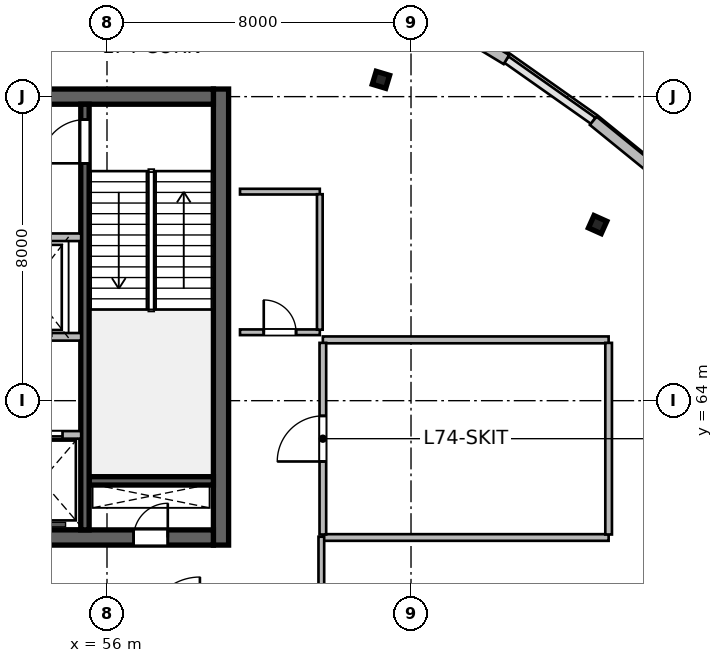
"""IFC4 building model, lengths in metres.
Left out: names, types, materials, properties, quantities, classifications, styles, units other than length and angle.
Written with IfcOpenShell. Run it as: python <this file> out.ifc"""

import sys

from ifc_helpers import new_model, si_unit, direction, frame, frame_2d, origin, origin_2d, place, context, subcontext, project, spatial, rectangle, i_section, extrude, source, transform, mapped, element, fill, save


model = new_model("IFC4")
c1 = context("Model", 3, precision=1e-05, world=origin(), true_north=direction((0.0, 1.0)))
c2 = subcontext(c1, "Body", "Model", "MODEL_VIEW")
j1 = project(units=[si_unit("LENGTHUNIT", "METRE"), si_unit("PLANEANGLEUNIT", "RADIAN")], contexts=[c1])
p1 = place(None, origin())
s1 = spatial("IfcSite", under=j1, at=p1, CompositionType="ELEMENT")
p2 = place(p1, origin())
s2 = spatial("IfcBuilding", under=s1, at=p2, CompositionType="ELEMENT")
p3 = place(p2, frame((0.0, 0.0, 303.0)))
s3 = spatial("IfcBuildingStorey", under=s2, at=p3, CompositionType="ELEMENT", Elevation=303.0)
m1 = source(origin(), c2, "Body", "SweptSolid", [
    extrude(rectangle(XDim=12.0, YDim=0.4, at=frame_2d((6.0, 0.0))), origin(), (0.0, 0.0, 1.0), 4.8),
])
p4 = place(p3, frame((59.0, 60.2, 0.0), z_axis=(0.0, 0.0, 1.0), x_axis=(0.0, 1.0, 0.0)))
e1 = element("IfcWall", 1, at=p4, inside=s3, PredefinedType="SHEAR", context=c2, shape_type="MappedRepresentation", body=[
    mapped(m1, transform((0.0, 0.0, 0.0), scale=1.0)),
])
m2 = source(origin(), c2, "Body", "SweptSolid", [
    extrude(rectangle(XDim=21.6, YDim=0.4, at=frame_2d((10.8, 0.0))), origin(), (0.0, 0.0, 1.0), 4.8),
])
p5 = place(p3, frame((37.2, 60.4, 0.0), z_axis=(0.0, 0.0, 1.0), x_axis=(1.0, 0.0, 0.0)))
e2 = element("IfcWall", 2, at=p5, inside=s3, PredefinedType="SHEAR", context=c2, shape_type="MappedRepresentation", body=[
    mapped(m2, transform((0.0, 0.0, 0.0), scale=1.0)),
])
p6 = place(p5, frame((1.1, 0.0, 0.0)))
e3 = element("IfcOpeningElement", 3, at=p6, cuts=e2, PredefinedType="OPENING", context=c2, shape_type="SweptSolid", body=[
    extrude(rectangle(XDim=1.15, YDim=2.15, at=frame_2d((0.575, 1.075))), frame((0.0, 0.21, 0.0), z_axis=(0.0, -1.0, 0.0), x_axis=(1.0, 0.0, 0.0)), (0.0, 0.0, 1.0), 0.42),
])
p7 = place(p5, frame((19.5, 0.0, 0.0)))
e4 = element("IfcOpeningElement", 4, at=p7, cuts=e2, PredefinedType="OPENING", context=c2, shape_type="SweptSolid", body=[
    extrude(rectangle(XDim=0.9, YDim=2.1, at=frame_2d((0.45, 1.05))), frame((0.0, 0.21, 0.0), z_axis=(0.0, -1.0, 0.0), x_axis=(1.0, 0.0, 0.0)), (0.0, 0.0, 1.0), 0.42),
])
p8 = place(p5, frame((12.02, 0.0, 0.0)))
e5 = element("IfcOpeningElement", 5, at=p8, cuts=e2, PredefinedType="OPENING", context=c2, shape_type="SweptSolid", body=[
    extrude(rectangle(XDim=1.6, YDim=2.15, at=frame_2d((0.8, 1.075))), frame((0.0, 0.21, 0.0), z_axis=(0.0, -1.0, 0.0), x_axis=(1.0, 0.0, 0.0)), (0.0, 0.0, 1.0), 0.42),
])
p9 = place(p3, frame((37.2, 72.0, 0.0), z_axis=(0.0, 0.0, 1.0), x_axis=(1.0, 0.0, 0.0)))
e6 = element("IfcWall", 6, at=p9, inside=s3, PredefinedType="SHEAR", context=c2, shape_type="MappedRepresentation", body=[
    mapped(m2, transform((0.0, 0.0, 0.0), scale=1.0)),
])
p10 = place(p9, frame((1.2, 0.0, 0.0)))
e7 = element("IfcOpeningElement", 7, at=p10, cuts=e6, PredefinedType="OPENING", context=c2, shape_type="SweptSolid", body=[
    extrude(rectangle(XDim=0.9, YDim=2.1, at=frame_2d((0.45, 1.05))), frame((0.0, 0.21, 0.0), z_axis=(0.0, -1.0, 0.0), x_axis=(1.0, 0.0, 0.0)), (0.0, 0.0, 1.0), 0.42),
])
p11 = place(p9, frame((14.7, 0.0, 0.0)))
e8 = element("IfcOpeningElement", 8, at=p11, cuts=e6, PredefinedType="OPENING", context=c2, shape_type="SweptSolid", body=[
    extrude(rectangle(XDim=1.2, YDim=2.15, at=frame_2d((0.6, 1.075))), frame((0.0, 0.21, 0.0), z_axis=(0.0, -1.0, 0.0), x_axis=(1.0, 0.0, 0.0)), (0.0, 0.0, 1.0), 0.42),
])
p12 = place(p9, frame((4.15, 0.0, 0.0)))
e9 = element("IfcOpeningElement", 9, at=p12, cuts=e6, PredefinedType="OPENING", context=c2, shape_type="SweptSolid", body=[
    extrude(rectangle(XDim=1.3, YDim=2.15, at=frame_2d((0.65, 1.075))), frame((0.0, 0.21, 0.0), z_axis=(0.0, -1.0, 0.0), x_axis=(1.0, 0.0, 0.0)), (0.0, 0.0, 1.0), 0.42),
])
p13 = place(p9, frame((6.76, 0.0, 0.0)))
e10 = element("IfcOpeningElement", 10, at=p13, cuts=e6, PredefinedType="OPENING", context=c2, shape_type="SweptSolid", body=[
    extrude(rectangle(XDim=0.85, YDim=2.1, at=frame_2d((0.425, 1.05))), frame((0.0, 0.21, 0.0), z_axis=(0.0, -1.0, 0.0), x_axis=(1.0, 0.0, 0.0)), (0.0, 0.0, 1.0), 0.42),
])
p14 = place(p9, frame((8.76, 0.0, 0.0)))
e11 = element("IfcOpeningElement", 11, at=p14, cuts=e6, PredefinedType="OPENING", context=c2, shape_type="SweptSolid", body=[
    extrude(rectangle(XDim=0.85, YDim=2.1, at=frame_2d((0.425, 1.05))), frame((0.0, 0.21, 0.0), z_axis=(0.0, -1.0, 0.0), x_axis=(1.0, 0.0, 0.0)), (0.0, 0.0, 1.0), 0.42),
])
p15 = place(p9, frame((10.725, 0.0, 0.0)))
e12 = element("IfcOpeningElement", 12, at=p15, cuts=e6, PredefinedType="OPENING", context=c2, shape_type="SweptSolid", body=[
    extrude(rectangle(XDim=0.85, YDim=2.1, at=frame_2d((0.425, 1.05))), frame((0.0, 0.21, 0.0), z_axis=(0.0, -1.0, 0.0), x_axis=(1.0, 0.0, 0.0)), (0.0, 0.0, 1.0), 0.42),
])
m3 = source(origin(), c2, "Body", "SweptSolid", [
    extrude(rectangle(XDim=3.27, YDim=0.22, at=frame_2d((1.635, 0.0))), origin(), (0.0, 0.0, 1.0), 4.8),
])
p16 = place(p3, frame((55.53, 61.89, 0.0), z_axis=(0.0, 0.0, 1.0), x_axis=(1.0, 0.0, 0.0)))
e13 = element("IfcWall", 13, at=p16, inside=s3, PredefinedType="SHEAR", context=c2, shape_type="MappedRepresentation", body=[
    mapped(m3, transform((0.0, 0.0, 0.0), scale=1.0)),
])
m4 = source(origin(), c2, "Body", "SweptSolid", [
    extrude(rectangle(XDim=11.2, YDim=0.22, at=frame_2d((5.6, 0.0))), origin(), (0.0, 0.0, 1.0), 4.8),
])
p17 = place(p3, frame((55.42, 60.6, 0.0), z_axis=(0.0, 0.0, 1.0), x_axis=(0.0, 1.0, 0.0)))
e14 = element("IfcWall", 14, at=p17, inside=s3, PredefinedType="SHEAR", context=c2, shape_type="MappedRepresentation", body=[
    mapped(m4, transform((0.0, 0.0, 0.0), scale=1.0)),
])
p18 = place(p17, frame((9.645, 0.0, 0.0)))
e15 = element("IfcOpeningElement", 15, at=p18, cuts=e14, PredefinedType="OPENING", context=c2, shape_type="SweptSolid", body=[
    extrude(rectangle(XDim=1.15, YDim=2.15, at=frame_2d((0.575, 1.075))), frame((0.0, 0.12, 0.0), z_axis=(0.0, -1.0, 0.0), x_axis=(1.0, 0.0, 0.0)), (0.0, 0.0, 1.0), 0.24),
])
m5 = source(origin(), c2, "Body", "SweptSolid", [
    extrude(i_section(OverallWidth=0.369, OverallDepth=0.356, WebThickness=0.011, FlangeThickness=0.018, at=origin_2d()), origin(), (0.0, 0.0, 1.0), 4.8),
])
for number, where, z_axis, x_axis in (
    (16, (63.209, 72.442, 0.0), (0.0, 0.0, 1.0), (0.289, 0.957, 0.0)),
    (17, (68.91, 68.633, 0.0), (0.0, 0.0, 1.0), (0.409, 0.912, 0.0)),
):
    element("IfcColumn", number, at=place(p3, frame(where, z_axis=z_axis, x_axis=x_axis)), inside=s3, PredefinedType="COLUMN", context=c2, shape_type="MappedRepresentation", body=[
        mapped(m5, transform((0.0, 0.0, 0.0), scale=1.0)),
    ])
m6 = source(origin(), c2, "Body", "SweptSolid", [
    extrude(rectangle(XDim=2.748, YDim=0.28, at=frame_2d((1.374, 0.0))), origin(), (0.0, 0.0, 1.0), 4.54),
])
p19 = place(p3, frame((64.157, 74.396, 0.0), z_axis=(0.0, 0.0, 1.0), x_axis=(0.856149718453, -0.516727838996, 0.0)))
e18 = element("IfcWall", 18, at=p19, inside=s3, PredefinedType="SOLIDWALL", context=c2, shape_type="MappedRepresentation", body=[
    mapped(m6, transform((0.0, 0.0, 0.0), scale=1.0)),
])
m7 = source(origin(), c2, "Body", "SweptSolid", [
    extrude(rectangle(XDim=2.812, YDim=0.28, at=frame_2d((1.406, 0.0))), origin(), (0.0, 0.0, 1.0), 4.54),
])
p20 = place(p3, frame((68.795, 71.365, 0.0), z_axis=(0.0, 0.0, 1.0), x_axis=(0.775880230716, -0.630880232361, 0.0)))
e19 = element("IfcWall", 19, at=p20, inside=s3, PredefinedType="SOLIDWALL", context=c2, shape_type="MappedRepresentation", body=[
    mapped(m7, transform((0.0, 0.0, 0.0), scale=1.0)),
])
m8 = source(origin(), c2, "Body", "SweptSolid", [
    extrude(rectangle(XDim=5.62, YDim=0.2, at=frame_2d((2.81, 0.0))), origin(), (0.0, 0.0, 1.0), 4.54),
])
p21 = place(p3, frame((49.7, 68.3, 0.0), z_axis=(0.0, 0.0, 1.0), x_axis=(1.0, 0.0, 0.0)))
e20 = element("IfcWall", 20, at=p21, inside=s3, PredefinedType="SOLIDWALL", context=c2, shape_type="MappedRepresentation", body=[
    mapped(m8, transform((0.0, 0.0, 0.0), scale=1.0)),
])
p22 = place(p21, frame((1.6, 0.0, 0.0)))
e21 = element("IfcOpeningElement", 21, at=p22, cuts=e20, PredefinedType="OPENING", context=c2, shape_type="SweptSolid", body=[
    extrude(rectangle(XDim=1.1, YDim=2.15, at=frame_2d((0.55, 1.075))), frame((0.0, 0.11, 0.0), z_axis=(0.0, -1.0, 0.0), x_axis=(1.0, 0.0, 0.0)), (0.0, 0.0, 1.0), 0.22),
])
p23 = place(p21, frame((3.7, 0.0, 0.0)))
e22 = element("IfcOpeningElement", 22, at=p23, cuts=e20, PredefinedType="OPENING", context=c2, shape_type="SweptSolid", body=[
    extrude(rectangle(XDim=1.1, YDim=2.15, at=frame_2d((0.55, 1.075))), frame((0.0, 0.11, 0.0), z_axis=(0.0, -1.0, 0.0), x_axis=(1.0, 0.0, 0.0)), (0.0, 0.0, 1.0), 0.22),
])
p24 = place(p3, frame((49.7, 65.68, 0.0), z_axis=(0.0, 0.0, 1.0), x_axis=(1.0, 0.0, 0.0)))
e23 = element("IfcWall", 23, at=p24, inside=s3, PredefinedType="SOLIDWALL", context=c2, shape_type="MappedRepresentation", body=[
    mapped(m8, transform((0.0, 0.0, 0.0), scale=1.0)),
])
m9 = source(origin(), c2, "Body", "SweptSolid", [
    extrude(rectangle(XDim=4.1, YDim=0.2, at=frame_2d((2.05, 0.0))), origin(), (0.0, 0.0, 1.0), 4.54),
])
p25 = place(p3, frame((51.22, 63.1, 0.0), z_axis=(0.0, 0.0, 1.0), x_axis=(1.0, 0.0, 0.0)))
e24 = element("IfcWall", 24, at=p25, inside=s3, PredefinedType="SOLIDWALL", context=c2, shape_type="MappedRepresentation", body=[
    mapped(m9, transform((0.0, 0.0, 0.0), scale=1.0)),
])
p26 = place(p25, frame((0.51, 0.0, 0.0)))
e25 = element("IfcOpeningElement", 25, at=p26, cuts=e24, PredefinedType="OPENING", context=c2, shape_type="SweptSolid", body=[
    extrude(rectangle(XDim=1.1, YDim=2.15, at=frame_2d((0.55, 1.075))), frame((0.0, 0.11, 0.0), z_axis=(0.0, -1.0, 0.0), x_axis=(1.0, 0.0, 0.0)), (0.0, 0.0, 1.0), 0.22),
])
p27 = place(p25, frame((2.51, 0.0, 0.0)))
e26 = element("IfcOpeningElement", 26, at=p27, cuts=e24, PredefinedType="OPENING", context=c2, shape_type="SweptSolid", body=[
    extrude(rectangle(XDim=1.1, YDim=2.15, at=frame_2d((0.55, 1.075))), frame((0.0, 0.11, 0.0), z_axis=(0.0, -1.0, 0.0), x_axis=(1.0, 0.0, 0.0)), (0.0, 0.0, 1.0), 0.22),
])
m10 = source(origin(), c2, "Body", "SweptSolid", [
    extrude(rectangle(XDim=2.1, YDim=0.15, at=frame_2d((1.05, 0.0))), origin(), (0.0, 0.0, 1.0), 4.54),
])
p28 = place(p3, frame((59.5, 65.8, 0.0), z_axis=(0.0, 0.0, 1.0), x_axis=(1.0, 0.0, 0.0)))
e27 = element("IfcWall", 27, at=p28, inside=s3, PredefinedType="PARTITIONING", context=c2, shape_type="MappedRepresentation", body=[
    mapped(m10, transform((0.0, 0.0, 0.0), scale=1.0)),
])
p29 = place(p28, frame((0.625, 0.0, 0.0)))
e28 = element("IfcOpeningElement", 28, at=p29, cuts=e27, PredefinedType="OPENING", context=c2, shape_type="SweptSolid", body=[
    extrude(rectangle(XDim=0.85, YDim=2.1, at=frame_2d((0.425, 1.05))), frame((0.0, 0.085, 0.0), z_axis=(0.0, -1.0, 0.0), x_axis=(1.0, 0.0, 0.0)), (0.0, 0.0, 1.0), 0.17),
])
p30 = place(p3, frame((59.5, 69.5, 0.0), z_axis=(0.0, 0.0, 1.0), x_axis=(1.0, 0.0, 0.0)))
e29 = element("IfcWall", 29, at=p30, inside=s3, PredefinedType="PARTITIONING", context=c2, shape_type="MappedRepresentation", body=[
    mapped(m10, transform((0.0, 0.0, 0.0), scale=1.0)),
])
m11 = source(origin(), c2, "Body", "SweptSolid", [
    extrude(rectangle(XDim=3.565, YDim=0.15, at=frame_2d((1.783, 0.0))), origin(), (0.0, 0.0, 1.0), 4.54),
])
p31 = place(p3, frame((61.6, 65.867, 0.0), z_axis=(0.0, 0.0, 1.0), x_axis=(0.0, 1.0, 0.0)))
e30 = element("IfcWall", 30, at=p31, inside=s3, PredefinedType="PARTITIONING", context=c2, shape_type="MappedRepresentation", body=[
    mapped(m11, transform((0.0, 0.0, 0.0), scale=1.0)),
])
m12 = source(origin(), c2, "Body", "SweptSolid", [
    extrude(rectangle(XDim=7.52, YDim=0.175, at=frame_2d((3.76, 0.0))), origin(), (0.0, 0.0, 1.0), 4.54),
])
p32 = place(p3, frame((61.68, 60.4, 0.0), z_axis=(0.0, 0.0, 1.0), x_axis=(1.0, 0.0, 0.0)))
e31 = element("IfcWall", 31, at=p32, inside=s3, PredefinedType="PARTITIONING", context=c2, shape_type="MappedRepresentation", body=[
    mapped(m12, transform((0.0, 0.0, 0.0), scale=1.0)),
])
m13 = source(origin(), c2, "Body", "SweptSolid", [
    extrude(rectangle(XDim=7.52, YDim=0.18, at=frame_2d((3.76, 0.0))), origin(), (0.0, 0.0, 1.0), 4.54),
])
p33 = place(p3, frame((61.68, 65.6, 0.0), z_axis=(0.0, 0.0, 1.0), x_axis=(1.0, 0.0, 0.0)))
e32 = element("IfcWall", 32, at=p33, inside=s3, PredefinedType="PLUMBINGWALL", context=c2, shape_type="MappedRepresentation", body=[
    mapped(m13, transform((0.0, 0.0, 0.0), scale=1.0)),
])
m14 = source(origin(), c2, "Body", "SweptSolid", [
    extrude(rectangle(XDim=5.042, YDim=0.175, at=frame_2d((2.521, 0.0))), origin(), (0.0, 0.0, 1.0), 4.54),
])
p34 = place(p3, frame((61.68, 60.479, 0.0), z_axis=(0.0, 0.0, 1.0), x_axis=(0.0, 1.0, 0.0)))
e33 = element("IfcWall", 33, at=p34, inside=s3, PredefinedType="PARTITIONING", context=c2, shape_type="MappedRepresentation", body=[
    mapped(m14, transform((0.0, 0.0, 0.0), scale=1.0)),
])
p35 = place(p34, frame((1.921, 0.0, 0.0)))
e34 = element("IfcOpeningElement", 34, at=p35, cuts=e33, PredefinedType="OPENING", context=c2, shape_type="SweptSolid", body=[
    extrude(rectangle(XDim=1.2, YDim=2.15, at=frame_2d((0.6, 1.075))), frame((0.0, 0.098, 0.0), z_axis=(0.0, -1.0, 0.0), x_axis=(1.0, 0.0, 0.0)), (0.0, 0.0, 1.0), 0.195),
])
p36 = place(p3, frame((69.2, 60.479, 0.0), z_axis=(0.0, 0.0, 1.0), x_axis=(0.0, 1.0, 0.0)))
e35 = element("IfcWall", 35, at=p36, inside=s3, PredefinedType="PARTITIONING", context=c2, shape_type="MappedRepresentation", body=[
    mapped(m14, transform((0.0, 0.0, 0.0), scale=1.0)),
])
m15 = source(origin(), c2, "Body", "SweptSolid", [
    extrude(rectangle(XDim=2.46, YDim=0.15, at=frame_2d((1.23, 0.0))), origin(), (0.0, 0.0, 1.0), 4.54),
])
p37 = place(p3, frame((61.64, 57.96, 0.0), z_axis=(0.0, 0.0, 1.0), x_axis=(0.0, 1.0, 0.0)))
e36 = element("IfcWall", 36, at=p37, inside=s3, PredefinedType="PARTITIONING", context=c2, shape_type="MappedRepresentation", body=[
    mapped(m15, transform((0.0, 0.0, 0.0), scale=1.0)),
])
m16 = source(origin(), c2, "Body", "SweptSolid", [
    extrude(rectangle(XDim=0.9, YDim=2.1, at=frame_2d((0.45, 1.05))), frame((0.0, 0.025, 0.0), z_axis=(0.0, -1.0, 0.0), x_axis=(1.0, 0.0, 0.0)), (0.0, 0.0, 1.0), 0.05),
])
p38 = place(p7, origin())
e37 = element("IfcDoor", 37, at=p38, inside=s3, OperationType="SINGLE_SWING_RIGHT", PredefinedType="DOOR", context=c2, shape_type="MappedRepresentation", body=[
    mapped(m16, transform((0.0, 0.0, 0.0), scale=1.0)),
])
fill(e4, e37)
m17 = source(origin(), c2, "Body", "SweptSolid", [
    extrude(rectangle(XDim=1.15, YDim=2.15, at=frame_2d((0.575, 1.075))), frame((0.0, 0.025, 0.0), z_axis=(0.0, -1.0, 0.0), x_axis=(1.0, 0.0, 0.0)), (0.0, 0.0, 1.0), 0.05),
])
p39 = place(p18, origin())
e38 = element("IfcDoor", 38, at=p39, inside=s3, OperationType="SINGLE_SWING_LEFT", PredefinedType="DOOR", context=c2, shape_type="MappedRepresentation", body=[
    mapped(m17, transform((0.0, 0.0, 0.0), scale=1.0)),
])
fill(e15, e38)
m18 = source(origin(), c2, "Body", "SweptSolid", [
    extrude(rectangle(XDim=1.1, YDim=2.15, at=frame_2d((0.55, 1.075))), frame((0.0, 0.025, 0.0), z_axis=(0.0, -1.0, 0.0), x_axis=(1.0, 0.0, 0.0)), (0.0, 0.0, 1.0), 0.05),
])
p40 = place(p27, origin())
e39 = element("IfcDoor", 39, at=p40, inside=s3, OperationType="DOUBLE_DOOR_SLIDING", PredefinedType="DOOR", context=c2, shape_type="MappedRepresentation", body=[
    mapped(m18, transform((0.0, 0.0, 0.0), scale=1.0)),
])
fill(e26, e39)
m19 = source(origin(), c2, "Body", "SweptSolid", [
    extrude(rectangle(XDim=0.85, YDim=2.1, at=frame_2d((0.425, 1.05))), frame((0.0, 0.025, 0.0), z_axis=(0.0, -1.0, 0.0), x_axis=(1.0, 0.0, 0.0)), (0.0, 0.0, 1.0), 0.05),
])
p41 = place(p29, origin())
e40 = element("IfcDoor", 40, at=p41, inside=s3, OperationType="SINGLE_SWING_LEFT", PredefinedType="DOOR", context=c2, shape_type="MappedRepresentation", body=[
    mapped(m19, transform((0.0, 0.0, 0.0), scale=1.0)),
])
fill(e28, e40)
m20 = source(origin(), c2, "Body", "SweptSolid", [
    extrude(rectangle(XDim=1.2, YDim=2.15, at=frame_2d((0.6, 1.075))), frame((0.0, 0.025, 0.0), z_axis=(0.0, -1.0, 0.0), x_axis=(1.0, 0.0, 0.0)), (0.0, 0.0, 1.0), 0.05),
])
p42 = place(p35, origin())
e41 = element("IfcDoor", 41, at=p42, inside=s3, OperationType="SINGLE_SWING_LEFT", PredefinedType="DOOR", context=c2, shape_type="MappedRepresentation", body=[
    mapped(m20, transform((0.0, 0.0, 0.0), scale=1.0)),
])
fill(e34, e41)
save(model, sys.argv[1])
